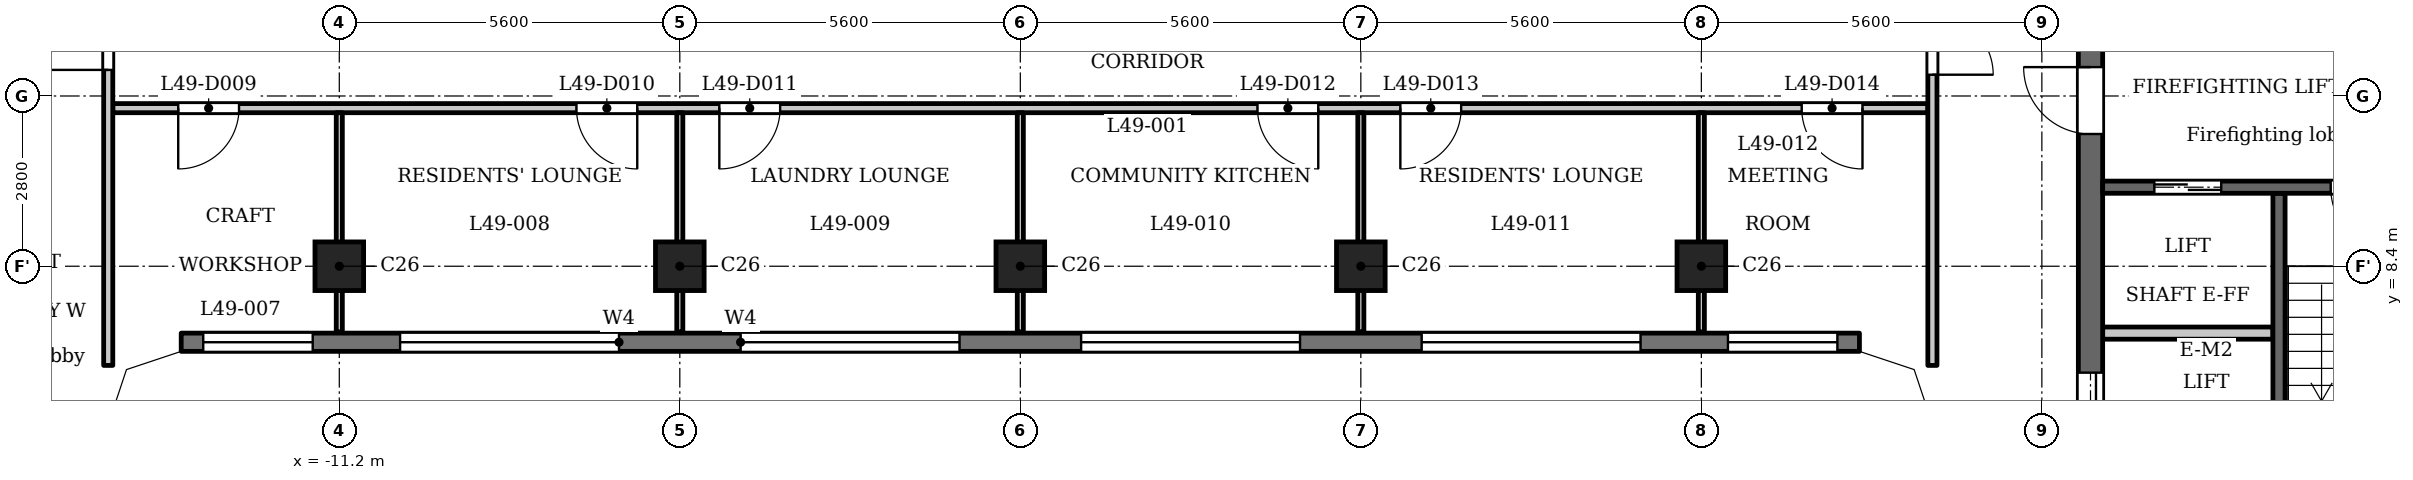
"""IFC4 building model, lengths in metres.
Left out: names, types, materials, properties, quantities, classifications, styles, units other than length and angle.
Written with IfcOpenShell. Run it as: python <this file> out.ifc"""

import sys

from ifc_helpers import new_model, si_unit, direction, frame, frame_2d, origin, origin_2d, place, context, subcontext, project, spatial, polyline, rectangle, outline, extrude, element, fill, save


model = new_model("IFC4")
c1 = context("Model", 3, precision=1e-05, world=origin(), true_north=direction((0.0, 1.0)))
c2 = subcontext(c1, "Body", "Model", "MODEL_VIEW")
j1 = project(units=[si_unit("LENGTHUNIT", "METRE"), si_unit("PLANEANGLEUNIT", "RADIAN")], contexts=[c1])
p1 = place(None, origin())
s1 = spatial("IfcSite", under=j1, at=p1, CompositionType="ELEMENT")
p2 = place(p1, origin())
s2 = spatial("IfcBuilding", under=s1, at=p2, CompositionType="ELEMENT")
p3 = place(p2, frame((0.0, 0.0, 192.4)))
s3 = spatial("IfcBuildingStorey", under=s2, at=p3, CompositionType="ELEMENT", Elevation=192.4)
for number, where, z_axis, x_axis in (
    (1, (-11.2, 8.4, 0.0), (0.0, 0.0, 1.0), (1.0, 0.0, 0.0)),
    (2, (-5.6, 8.4, 0.0), (0.0, 0.0, 1.0), (1.0, 0.0, 0.0)),
    (3, (0.0, 8.4, 0.0), (0.0, 0.0, 1.0), (1.0, 0.0, 0.0)),
    (4, (5.6, 8.4, 0.0), (0.0, 0.0, 1.0), (1.0, 0.0, 0.0)),
    (5, (11.2, 8.4, 0.0), (0.0, 0.0, 1.0), (1.0, 0.0, 0.0)),
):
    element("IfcColumn", number, at=place(p3, frame(where, z_axis=z_axis, x_axis=x_axis)), inside=s3, PredefinedType="COLUMN", context=c2, shape_type="SweptSolid", body=[
        extrude(rectangle(XDim=0.8, YDim=0.8, at=origin_2d()), origin(), (0.0, 0.0, 1.0), 3.5),
    ])
p4 = place(p3, frame((-13.8, 7.15, 0.0), z_axis=(0.0, 0.0, 1.0), x_axis=(1.0, 0.0, 0.0)))
e6 = element("IfcWall", 6, at=p4, inside=s3, PredefinedType="SOLIDWALL", context=c2, shape_type="SweptSolid", body=[
    extrude(rectangle(XDim=27.6, YDim=0.3, at=frame_2d((13.8, 0.0))), origin(), (0.0, 0.0, 1.0), 3.2),
])
p5 = place(p4, frame((0.363, 0.0, 0.9)))
e7 = element("IfcOpeningElement", 7, at=p5, cuts=e6, PredefinedType="OPENING", context=c2, shape_type="SweptSolid", body=[
    extrude(rectangle(XDim=1.8, YDim=1.25, at=frame_2d((0.9, 0.625))), frame((0.0, 0.16, 0.0), z_axis=(0.0, -1.0, 0.0), x_axis=(1.0, 0.0, 0.0)), (0.0, 0.0, 1.0), 0.32),
])
p6 = place(p4, frame((3.6, 0.0, 1.2)))
e8 = element("IfcOpeningElement", 8, at=p6, cuts=e6, PredefinedType="OPENING", context=c2, shape_type="SweptSolid", body=[
    extrude(rectangle(XDim=3.6, YDim=0.95, at=frame_2d((1.8, 0.475))), frame((0.0, 0.16, 0.0), z_axis=(0.0, -1.0, 0.0), x_axis=(1.0, 0.0, 0.0)), (0.0, 0.0, 1.0), 0.32),
])
p7 = place(p4, frame((9.2, 0.0, 1.2)))
e9 = element("IfcOpeningElement", 9, at=p7, cuts=e6, PredefinedType="OPENING", context=c2, shape_type="SweptSolid", body=[
    extrude(rectangle(XDim=3.6, YDim=0.95, at=frame_2d((1.8, 0.475))), frame((0.0, 0.16, 0.0), z_axis=(0.0, -1.0, 0.0), x_axis=(1.0, 0.0, 0.0)), (0.0, 0.0, 1.0), 0.32),
])
p8 = place(p4, frame((14.8, 0.0, 1.2)))
e10 = element("IfcOpeningElement", 10, at=p8, cuts=e6, PredefinedType="OPENING", context=c2, shape_type="SweptSolid", body=[
    extrude(rectangle(XDim=3.6, YDim=0.95, at=frame_2d((1.8, 0.475))), frame((0.0, 0.16, 0.0), z_axis=(0.0, -1.0, 0.0), x_axis=(1.0, 0.0, 0.0)), (0.0, 0.0, 1.0), 0.32),
])
p9 = place(p4, frame((20.4, 0.0, 1.2)))
e11 = element("IfcOpeningElement", 11, at=p9, cuts=e6, PredefinedType="OPENING", context=c2, shape_type="SweptSolid", body=[
    extrude(rectangle(XDim=3.6, YDim=0.95, at=frame_2d((1.8, 0.475))), frame((0.0, 0.16, 0.0), z_axis=(0.0, -1.0, 0.0), x_axis=(1.0, 0.0, 0.0)), (0.0, 0.0, 1.0), 0.32),
])
p10 = place(p4, frame((25.438, 0.0, 0.9)))
e12 = element("IfcOpeningElement", 12, at=p10, cuts=e6, PredefinedType="OPENING", context=c2, shape_type="SweptSolid", body=[
    extrude(rectangle(XDim=1.8, YDim=1.25, at=frame_2d((0.9, 0.625))), frame((0.0, 0.16, 0.0), z_axis=(0.0, -1.0, 0.0), x_axis=(1.0, 0.0, 0.0)), (0.0, 0.0, 1.0), 0.32),
])
p11 = place(p3, frame((20.7, 2.6, 0.0), z_axis=(0.0, 0.0, 1.0), x_axis=(0.0, 1.0, 0.0)))
e13 = element("IfcWall", 13, at=p11, inside=s3, PredefinedType="SHEAR", context=c2, shape_type="SweptSolid", body=[
    extrude(rectangle(XDim=7.0, YDim=0.2, at=frame_2d((3.5, 0.0))), origin(), (0.0, 0.0, 1.0), 3.2),
])
p12 = place(p3, frame((17.6, -12.45, 0.0), z_axis=(0.0, 0.0, 1.0), x_axis=(0.0, 1.0, 0.0)))
e14 = element("IfcWall", 14, at=p12, inside=s3, PredefinedType="SHEAR", context=c2, shape_type="SweptSolid", body=[
    extrude(rectangle(XDim=24.9, YDim=0.4, at=frame_2d((12.45, 0.0))), origin(), (0.0, 0.0, 1.0), 3.2),
])
p13 = place(p12, frame((6.325, 0.0, 0.0)))
e15 = element("IfcOpeningElement", 15, at=p13, cuts=e14, PredefinedType="OPENING", context=c2, shape_type="SweptSolid", body=[
    extrude(rectangle(XDim=0.9, YDim=2.1, at=frame_2d((0.45, 1.05))), frame((0.0, 0.21, 0.0), z_axis=(0.0, -1.0, 0.0), x_axis=(1.0, 0.0, 0.0)), (0.0, 0.0, 1.0), 0.42),
])
p14 = place(p12, frame((9.925, 0.0, 0.0)))
e16 = element("IfcOpeningElement", 16, at=p14, cuts=e14, PredefinedType="OPENING", context=c2, shape_type="SweptSolid", body=[
    extrude(rectangle(XDim=0.9, YDim=2.1, at=frame_2d((0.45, 1.05))), frame((0.0, 0.21, 0.0), z_axis=(0.0, -1.0, 0.0), x_axis=(1.0, 0.0, 0.0)), (0.0, 0.0, 1.0), 0.42),
])
p15 = place(p12, frame((15.6, 0.0, 0.0)))
e17 = element("IfcOpeningElement", 17, at=p15, cuts=e14, PredefinedType="OPENING", context=c2, shape_type="SweptSolid", body=[
    extrude(rectangle(XDim=1.1, YDim=2.1, at=frame_2d((0.55, 1.05))), frame((0.0, 0.21, 0.0), z_axis=(0.0, -1.0, 0.0), x_axis=(1.0, 0.0, 0.0)), (0.0, 0.0, 1.0), 0.42),
])
p16 = place(p12, frame((18.0, 0.0, 0.0)))
e18 = element("IfcOpeningElement", 18, at=p16, cuts=e14, PredefinedType="OPENING", context=c2, shape_type="SweptSolid", body=[
    extrude(rectangle(XDim=1.1, YDim=2.1, at=frame_2d((0.55, 1.05))), frame((0.0, 0.21, 0.0), z_axis=(0.0, -1.0, 0.0), x_axis=(1.0, 0.0, 0.0)), (0.0, 0.0, 1.0), 0.42),
])
p17 = place(p12, frame((23.025, 0.0, 0.0)))
e19 = element("IfcOpeningElement", 19, at=p17, cuts=e14, PredefinedType="OPENING", context=c2, shape_type="SweptSolid", body=[
    extrude(rectangle(XDim=1.1, YDim=2.1, at=frame_2d((0.55, 1.05))), frame((0.0, 0.21, 0.0), z_axis=(0.0, -1.0, 0.0), x_axis=(1.0, 0.0, 0.0)), (0.0, 0.0, 1.0), 0.42),
])
p18 = place(p12, frame((0.775, 0.0, 0.0)))
e20 = element("IfcOpeningElement", 20, at=p18, cuts=e14, PredefinedType="OPENING", context=c2, shape_type="SweptSolid", body=[
    extrude(rectangle(XDim=1.1, YDim=2.1, at=frame_2d((0.55, 1.05))), frame((0.0, 0.21, 0.0), z_axis=(0.0, -1.0, 0.0), x_axis=(1.0, 0.0, 0.0)), (0.0, 0.0, 1.0), 0.42),
])
p19 = place(p12, frame((12.925, 0.0, 0.0)))
e21 = element("IfcOpeningElement", 21, at=p19, cuts=e14, PredefinedType="OPENING", context=c2, shape_type="SweptSolid", body=[
    extrude(rectangle(XDim=1.8, YDim=2.1, at=frame_2d((0.9, 1.05))), frame((0.0, 0.21, 0.0), z_axis=(0.0, -1.0, 0.0), x_axis=(1.0, 0.0, 0.0)), (0.0, 0.0, 1.0), 0.42),
])
p20 = place(p3, frame((17.8, 7.3, 0.0), z_axis=(0.0, 0.0, 1.0), x_axis=(1.0, 0.0, 0.0)))
e22 = element("IfcWall", 22, at=p20, inside=s3, PredefinedType="PARTITIONING", context=c2, shape_type="SweptSolid", body=[
    extrude(rectangle(XDim=2.8, YDim=0.2, at=frame_2d((1.4, 0.0))), origin(), (0.0, 0.0, 1.0), 3.2),
])
p21 = place(p3, frame((17.8, 9.7, 0.0), z_axis=(0.0, 0.0, 1.0), x_axis=(1.0, 0.0, 0.0)))
e23 = element("IfcWall", 23, at=p21, inside=s3, PredefinedType="SHEAR", context=c2, shape_type="SweptSolid", body=[
    extrude(rectangle(XDim=5.65, YDim=0.2, at=frame_2d((2.825, 0.0))), origin(), (0.0, 0.0, 1.0), 3.2),
])
p22 = place(p21, frame((0.85, 0.0, 0.0)))
e24 = element("IfcOpeningElement", 24, at=p22, cuts=e23, PredefinedType="OPENING", context=c2, shape_type="SweptSolid", body=[
    extrude(rectangle(XDim=1.1, YDim=2.1, at=frame_2d((0.55, 1.05))), frame((0.0, 0.11, 0.0), z_axis=(0.0, -1.0, 0.0), x_axis=(1.0, 0.0, 0.0)), (0.0, 0.0, 1.0), 0.22),
])
p23 = place(p21, frame((3.75, 0.0, 0.0)))
e25 = element("IfcOpeningElement", 25, at=p23, cuts=e23, PredefinedType="OPENING", context=c2, shape_type="SweptSolid", body=[
    extrude(rectangle(XDim=1.1, YDim=2.1, at=frame_2d((0.55, 1.05))), frame((0.0, 0.11, 0.0), z_axis=(0.0, -1.0, 0.0), x_axis=(1.0, 0.0, 0.0)), (0.0, 0.0, 1.0), 0.22),
])
p24 = place(p3, frame((-14.925, 11.0, 0.0), z_axis=(0.0, 0.0, 1.0), x_axis=(1.0, 0.0, 0.0)))
e26 = element("IfcWall", 26, at=p24, inside=s3, PredefinedType="PARTITIONING", context=c2, shape_type="SweptSolid", body=[
    extrude(rectangle(XDim=29.85, YDim=0.15, at=frame_2d((14.925, 0.0))), origin(), (0.0, 0.0, 1.0), 3.2),
])
p25 = place(p24, frame((1.076, 0.0, 0.0)))
e27 = element("IfcOpeningElement", 27, at=p25, cuts=e26, PredefinedType="OPENING", context=c2, shape_type="SweptSolid", body=[
    extrude(rectangle(XDim=1.0, YDim=2.1, at=frame_2d((0.5, 1.05))), frame((0.0, 0.085, 0.0), z_axis=(0.0, -1.0, 0.0), x_axis=(1.0, 0.0, 0.0)), (0.0, 0.0, 1.0), 0.17),
])
p26 = place(p24, frame((7.625, 0.0, 0.0)))
e28 = element("IfcOpeningElement", 28, at=p26, cuts=e26, PredefinedType="OPENING", context=c2, shape_type="SweptSolid", body=[
    extrude(rectangle(XDim=1.0, YDim=2.1, at=frame_2d((0.5, 1.05))), frame((0.0, 0.085, 0.0), z_axis=(0.0, -1.0, 0.0), x_axis=(1.0, 0.0, 0.0)), (0.0, 0.0, 1.0), 0.17),
])
p27 = place(p24, frame((9.975, 0.0, 0.0)))
e29 = element("IfcOpeningElement", 29, at=p27, cuts=e26, PredefinedType="OPENING", context=c2, shape_type="SweptSolid", body=[
    extrude(rectangle(XDim=1.0, YDim=2.1, at=frame_2d((0.5, 1.05))), frame((0.0, 0.085, 0.0), z_axis=(0.0, -1.0, 0.0), x_axis=(1.0, 0.0, 0.0)), (0.0, 0.0, 1.0), 0.17),
])
p28 = place(p24, frame((18.825, 0.0, 0.0)))
e30 = element("IfcOpeningElement", 30, at=p28, cuts=e26, PredefinedType="OPENING", context=c2, shape_type="SweptSolid", body=[
    extrude(rectangle(XDim=1.0, YDim=2.1, at=frame_2d((0.5, 1.05))), frame((0.0, 0.085, 0.0), z_axis=(0.0, -1.0, 0.0), x_axis=(1.0, 0.0, 0.0)), (0.0, 0.0, 1.0), 0.17),
])
p29 = place(p24, frame((21.175, 0.0, 0.0)))
e31 = element("IfcOpeningElement", 31, at=p29, cuts=e26, PredefinedType="OPENING", context=c2, shape_type="SweptSolid", body=[
    extrude(rectangle(XDim=1.0, YDim=2.1, at=frame_2d((0.5, 1.05))), frame((0.0, 0.085, 0.0), z_axis=(0.0, -1.0, 0.0), x_axis=(1.0, 0.0, 0.0)), (0.0, 0.0, 1.0), 0.17),
])
p30 = place(p24, frame((27.775, 0.0, 0.0)))
e32 = element("IfcOpeningElement", 32, at=p30, cuts=e26, PredefinedType="OPENING", context=c2, shape_type="SweptSolid", body=[
    extrude(rectangle(XDim=1.0, YDim=2.1, at=frame_2d((0.5, 1.05))), frame((0.0, 0.085, 0.0), z_axis=(0.0, -1.0, 0.0), x_axis=(1.0, 0.0, 0.0)), (0.0, 0.0, 1.0), 0.17),
])
p31 = place(p3, frame((-15.0, 6.769, 0.0), z_axis=(0.0, 0.0, 1.0), x_axis=(0.0, 1.0, 0.0)))
e33 = element("IfcWall", 33, at=p31, inside=s3, PredefinedType="PARTITIONING", context=c2, shape_type="SweptSolid", body=[
    extrude(rectangle(XDim=6.356, YDim=0.15, at=frame_2d((3.178, 0.0))), origin(), (0.0, 0.0, 1.0), 3.2),
])
p32 = place(p31, frame((4.86, 0.0, 0.0)))
e34 = element("IfcOpeningElement", 34, at=p32, cuts=e33, PredefinedType="OPENING", context=c2, shape_type="SweptSolid", body=[
    extrude(rectangle(XDim=1.0, YDim=2.1, at=frame_2d((0.5, 1.05))), frame((0.0, 0.085, 0.0), z_axis=(0.0, -1.0, 0.0), x_axis=(1.0, 0.0, 0.0)), (0.0, 0.0, 1.0), 0.17),
])
for number, where, z_axis, x_axis in (
    (35, (-11.2, 7.32, 0.0), (0.0, 0.0, 1.0), (0.0, 1.0, 0.0)),
    (36, (-5.6, 7.32, 0.0), (0.0, 0.0, 1.0), (0.0, 1.0, 0.0)),
    (37, (0.0, 7.32, 0.0), (0.0, 0.0, 1.0), (0.0, 1.0, 0.0)),
    (38, (5.6, 7.32, 0.0), (0.0, 0.0, 1.0), (0.0, 1.0, 0.0)),
    (39, (11.2, 7.32, 0.0), (0.0, 0.0, 1.0), (0.0, 1.0, 0.0)),
):
    element("IfcWall", number, at=place(p3, frame(where, z_axis=z_axis, x_axis=x_axis)), inside=s3, PredefinedType="PARTITIONING", context=c2, shape_type="SweptSolid", body=[
        extrude(rectangle(XDim=3.605, YDim=0.1, at=frame_2d((1.802, 0.0))), origin(), (0.0, 0.0, 1.0), 3.2),
    ])
p33 = place(p3, frame((15.0, 6.769, 0.0), z_axis=(0.0, 0.0, 1.0), x_axis=(0.0, 1.0, 0.0)))
e40 = element("IfcWall", 40, at=p33, inside=s3, PredefinedType="PARTITIONING", context=c2, shape_type="SweptSolid", body=[
    extrude(rectangle(XDim=6.356, YDim=0.15, at=frame_2d((3.178, 0.0))), origin(), (0.0, 0.0, 1.0), 3.2),
])
p34 = place(p33, frame((4.781, 0.0, 0.0)))
e41 = element("IfcOpeningElement", 41, at=p34, cuts=e40, PredefinedType="OPENING", context=c2, shape_type="SweptSolid", body=[
    extrude(rectangle(XDim=1.0, YDim=2.1, at=frame_2d((0.5, 1.05))), frame((0.0, 0.085, 0.0), z_axis=(0.0, -1.0, 0.0), x_axis=(1.0, 0.0, 0.0)), (0.0, 0.0, 1.0), 0.17),
])
p35 = place(p3, origin())
e42 = element("IfcWall", 42, at=p35, inside=s3, PredefinedType="SOLIDWALL", context=c2, shape_type="SweptSolid", body=[
    extrude(outline(polyline([(-13.849, 7.3), (-14.937, 6.937), (-15.3, 5.849), (-15.3, 5.8), (-15.0, 5.8), (-14.7, 6.7), (-13.8, 7.0), (-13.8, 7.3), (-13.849, 7.3)])), origin(), (0.0, 0.0, 1.0), 3.2),
])
e43 = element("IfcWall", 43, at=p35, inside=s3, PredefinedType="SOLIDWALL", context=c2, shape_type="SweptSolid", body=[
    extrude(outline(polyline([(14.937, 6.937), (13.849, 7.3), (13.8, 7.3), (13.8, 7.0), (14.7, 6.7), (15.0, 5.8), (15.3, 5.8), (15.3, 5.849), (14.937, 6.937)])), origin(), (0.0, 0.0, 1.0), 3.2),
])
p36 = place(p16, origin())
e44 = element("IfcDoor", 44, at=p36, inside=s3, OperationType="DOUBLE_DOOR_SLIDING", PredefinedType="DOOR", context=c2, shape_type="SweptSolid", body=[
    extrude(rectangle(XDim=1.1, YDim=2.1, at=frame_2d((0.55, 1.05))), frame((0.0, 0.025, 0.0), z_axis=(0.0, -1.0, 0.0), x_axis=(1.0, 0.0, 0.0)), (0.0, 0.0, 1.0), 0.05),
])
fill(e18, e44)
p37 = place(p22, origin())
e45 = element("IfcDoor", 45, at=p37, inside=s3, OperationType="DOUBLE_DOOR_SLIDING", PredefinedType="DOOR", context=c2, shape_type="SweptSolid", body=[
    extrude(rectangle(XDim=1.1, YDim=2.1, at=frame_2d((0.55, 1.05))), frame((0.0, 0.025, 0.0), z_axis=(0.0, -1.0, 0.0), x_axis=(1.0, 0.0, 0.0)), (0.0, 0.0, 1.0), 0.05),
])
fill(e24, e45)
p38 = place(p17, origin())
e46 = element("IfcDoor", 46, at=p38, inside=s3, OperationType="SINGLE_SWING_LEFT", PredefinedType="DOOR", context=c2, shape_type="SweptSolid", body=[
    extrude(rectangle(XDim=1.1, YDim=2.1, at=frame_2d((0.55, 1.05))), frame((0.0, 0.025, 0.0), z_axis=(0.0, -1.0, 0.0), x_axis=(1.0, 0.0, 0.0)), (0.0, 0.0, 1.0), 0.05),
])
fill(e19, e46)
p39 = place(p23, origin())
e47 = element("IfcDoor", 47, at=p39, inside=s3, OperationType="SINGLE_SWING_RIGHT", PredefinedType="DOOR", context=c2, shape_type="SweptSolid", body=[
    extrude(rectangle(XDim=1.1, YDim=2.1, at=frame_2d((0.55, 1.05))), frame((0.0, 0.025, 0.0), z_axis=(0.0, -1.0, 0.0), x_axis=(1.0, 0.0, 0.0)), (0.0, 0.0, 1.0), 0.05),
])
fill(e25, e47)
p40 = place(p32, origin())
e48 = element("IfcDoor", 48, at=p40, inside=s3, OperationType="SINGLE_SWING_RIGHT", PredefinedType="DOOR", context=c2, shape_type="SweptSolid", body=[
    extrude(rectangle(XDim=1.0, YDim=2.1, at=frame_2d((0.5, 1.05))), frame((0.0, 0.025, 0.0), z_axis=(0.0, -1.0, 0.0), x_axis=(1.0, 0.0, 0.0)), (0.0, 0.0, 1.0), 0.05),
])
fill(e34, e48)
p41 = place(p34, origin())
e49 = element("IfcDoor", 49, at=p41, inside=s3, OperationType="SINGLE_SWING_LEFT", PredefinedType="DOOR", context=c2, shape_type="SweptSolid", body=[
    extrude(rectangle(XDim=1.0, YDim=2.1, at=frame_2d((0.5, 1.05))), frame((0.0, 0.025, 0.0), z_axis=(0.0, -1.0, 0.0), x_axis=(1.0, 0.0, 0.0)), (0.0, 0.0, 1.0), 0.05),
])
fill(e41, e49)
p42 = place(p25, origin())
e50 = element("IfcDoor", 50, at=p42, inside=s3, OperationType="SINGLE_SWING_LEFT", PredefinedType="DOOR", context=c2, shape_type="SweptSolid", body=[
    extrude(rectangle(XDim=1.0, YDim=2.1, at=frame_2d((0.5, 1.05))), frame((0.0, 0.025, 0.0), z_axis=(0.0, -1.0, 0.0), x_axis=(1.0, 0.0, 0.0)), (0.0, 0.0, 1.0), 0.05),
])
fill(e27, e50)
p43 = place(p26, origin())
e51 = element("IfcDoor", 51, at=p43, inside=s3, OperationType="SINGLE_SWING_RIGHT", PredefinedType="DOOR", context=c2, shape_type="SweptSolid", body=[
    extrude(rectangle(XDim=1.0, YDim=2.1, at=frame_2d((0.5, 1.05))), frame((0.0, 0.025, 0.0), z_axis=(0.0, -1.0, 0.0), x_axis=(1.0, 0.0, 0.0)), (0.0, 0.0, 1.0), 0.05),
])
fill(e28, e51)
p44 = place(p27, origin())
e52 = element("IfcDoor", 52, at=p44, inside=s3, OperationType="SINGLE_SWING_LEFT", PredefinedType="DOOR", context=c2, shape_type="SweptSolid", body=[
    extrude(rectangle(XDim=1.0, YDim=2.1, at=frame_2d((0.5, 1.05))), frame((0.0, 0.025, 0.0), z_axis=(0.0, -1.0, 0.0), x_axis=(1.0, 0.0, 0.0)), (0.0, 0.0, 1.0), 0.05),
])
fill(e29, e52)
p45 = place(p28, origin())
e53 = element("IfcDoor", 53, at=p45, inside=s3, OperationType="SINGLE_SWING_RIGHT", PredefinedType="DOOR", context=c2, shape_type="SweptSolid", body=[
    extrude(rectangle(XDim=1.0, YDim=2.1, at=frame_2d((0.5, 1.05))), frame((0.0, 0.025, 0.0), z_axis=(0.0, -1.0, 0.0), x_axis=(1.0, 0.0, 0.0)), (0.0, 0.0, 1.0), 0.05),
])
fill(e30, e53)
p46 = place(p29, origin())
e54 = element("IfcDoor", 54, at=p46, inside=s3, OperationType="SINGLE_SWING_LEFT", PredefinedType="DOOR", context=c2, shape_type="SweptSolid", body=[
    extrude(rectangle(XDim=1.0, YDim=2.1, at=frame_2d((0.5, 1.05))), frame((0.0, 0.025, 0.0), z_axis=(0.0, -1.0, 0.0), x_axis=(1.0, 0.0, 0.0)), (0.0, 0.0, 1.0), 0.05),
])
fill(e31, e54)
p47 = place(p30, origin())
e55 = element("IfcDoor", 55, at=p47, inside=s3, OperationType="SINGLE_SWING_RIGHT", PredefinedType="DOOR", context=c2, shape_type="SweptSolid", body=[
    extrude(rectangle(XDim=1.0, YDim=2.1, at=frame_2d((0.5, 1.05))), frame((0.0, 0.025, 0.0), z_axis=(0.0, -1.0, 0.0), x_axis=(1.0, 0.0, 0.0)), (0.0, 0.0, 1.0), 0.05),
])
fill(e32, e55)
p48 = place(p5, origin())
e56 = element("IfcWindow", 56, at=p48, inside=s3, PartitioningType="SINGLE_PANEL", PredefinedType="WINDOW", context=c2, shape_type="SweptSolid", body=[
    extrude(rectangle(XDim=1.8, YDim=1.25, at=frame_2d((0.9, 0.625))), frame((0.0, 0.03, 0.0), z_axis=(0.0, -1.0, 0.0), x_axis=(1.0, 0.0, 0.0)), (0.0, 0.0, 1.0), 0.06),
])
fill(e7, e56)
p49 = place(p6, origin())
e57 = element("IfcWindow", 57, at=p49, inside=s3, PartitioningType="SINGLE_PANEL", PredefinedType="WINDOW", context=c2, shape_type="SweptSolid", body=[
    extrude(rectangle(XDim=3.6, YDim=0.95, at=frame_2d((1.8, 0.475))), frame((0.0, 0.03, 0.0), z_axis=(0.0, -1.0, 0.0), x_axis=(1.0, 0.0, 0.0)), (0.0, 0.0, 1.0), 0.06),
])
fill(e8, e57)
p50 = place(p7, origin())
e58 = element("IfcWindow", 58, at=p50, inside=s3, PartitioningType="SINGLE_PANEL", PredefinedType="WINDOW", context=c2, shape_type="SweptSolid", body=[
    extrude(rectangle(XDim=3.6, YDim=0.95, at=frame_2d((1.8, 0.475))), frame((0.0, 0.03, 0.0), z_axis=(0.0, -1.0, 0.0), x_axis=(1.0, 0.0, 0.0)), (0.0, 0.0, 1.0), 0.06),
])
fill(e9, e58)
p51 = place(p8, origin())
e59 = element("IfcWindow", 59, at=p51, inside=s3, PartitioningType="SINGLE_PANEL", PredefinedType="WINDOW", context=c2, shape_type="SweptSolid", body=[
    extrude(rectangle(XDim=3.6, YDim=0.95, at=frame_2d((1.8, 0.475))), frame((0.0, 0.03, 0.0), z_axis=(0.0, -1.0, 0.0), x_axis=(1.0, 0.0, 0.0)), (0.0, 0.0, 1.0), 0.06),
])
fill(e10, e59)
p52 = place(p9, origin())
e60 = element("IfcWindow", 60, at=p52, inside=s3, PartitioningType="SINGLE_PANEL", PredefinedType="WINDOW", context=c2, shape_type="SweptSolid", body=[
    extrude(rectangle(XDim=3.6, YDim=0.95, at=frame_2d((1.8, 0.475))), frame((0.0, 0.03, 0.0), z_axis=(0.0, -1.0, 0.0), x_axis=(1.0, 0.0, 0.0)), (0.0, 0.0, 1.0), 0.06),
])
fill(e11, e60)
p53 = place(p10, origin())
e61 = element("IfcWindow", 61, at=p53, inside=s3, PartitioningType="SINGLE_PANEL", PredefinedType="WINDOW", context=c2, shape_type="SweptSolid", body=[
    extrude(rectangle(XDim=1.8, YDim=1.25, at=frame_2d((0.9, 0.625))), frame((0.0, 0.03, 0.0), z_axis=(0.0, -1.0, 0.0), x_axis=(1.0, 0.0, 0.0)), (0.0, 0.0, 1.0), 0.06),
])
fill(e12, e61)
save(model, sys.argv[1])
